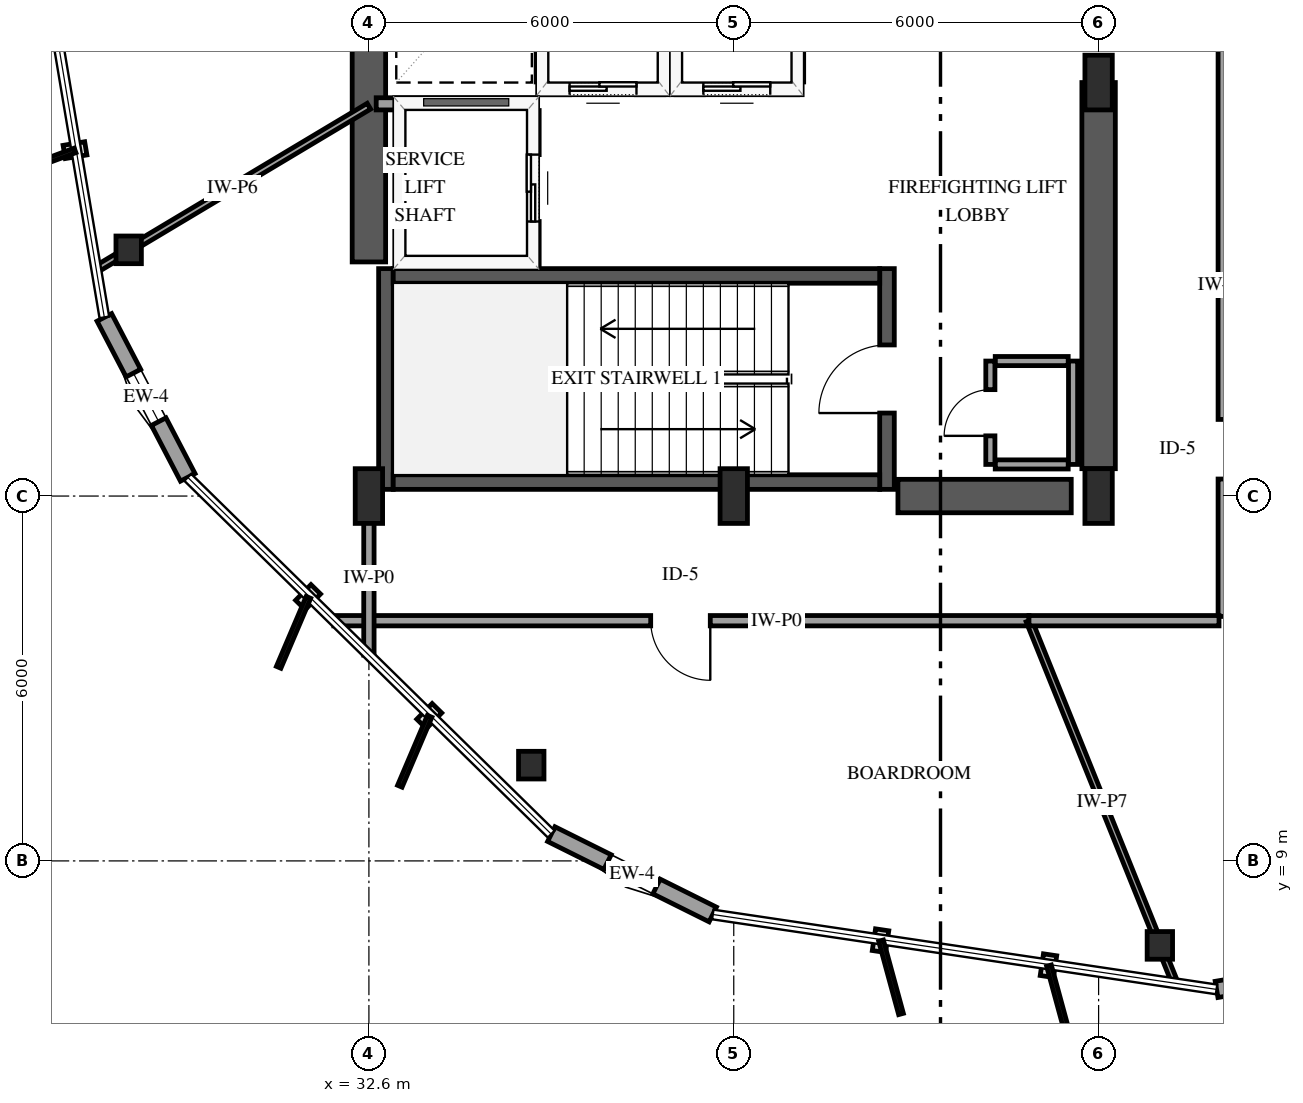
"""IFC4 building model, lengths in metres.
Left out: names, types, materials, properties, quantities, classifications, styles, units other than length and angle.
Written with IfcOpenShell. Run it as: python <this file> out.ifc"""

import sys

from ifc_helpers import new_model, si_unit, direction, frame, frame_2d, origin, origin_2d, place, context, subcontext, project, spatial, rectangle, i_section, extrude, element, fill, save


model = new_model("IFC4")
c1 = context("Model", 3, precision=1e-05, world=origin(), true_north=direction((0.0, 1.0)))
c2 = subcontext(c1, "Body", "Model", "MODEL_VIEW")
j1 = project(units=[si_unit("LENGTHUNIT", "METRE"), si_unit("PLANEANGLEUNIT", "RADIAN")], contexts=[c1])
p1 = place(None, origin())
s1 = spatial("IfcSite", under=j1, at=p1, CompositionType="ELEMENT")
p2 = place(p1, origin())
s2 = spatial("IfcBuilding", under=s1, at=p2, CompositionType="ELEMENT")
p3 = place(p2, frame((0.0, 0.0, 134.2)))
s3 = spatial("IfcBuildingStorey", under=s2, at=p3, CompositionType="ELEMENT", Elevation=134.2)
p4 = place(p3, frame((32.88, 15.11, 0.0), z_axis=(0.0, 0.0, 1.0), x_axis=(0.0, 1.0, 0.0)))
e1 = element("IfcWall", 1, at=p4, inside=s3, PredefinedType="SHEAR", context=c2, shape_type="SweptSolid", body=[
    extrude(rectangle(XDim=3.63, YDim=0.24, at=frame_2d((1.815, 0.0))), origin(), (0.0, 0.0, 1.0), 4.8),
])
p5 = place(p3, frame((41.12, 15.11, 0.0), z_axis=(0.0, 0.0, 1.0), x_axis=(0.0, 1.0, 0.0)))
e2 = element("IfcWall", 2, at=p5, inside=s3, PredefinedType="SHEAR", context=c2, shape_type="SweptSolid", body=[
    extrude(rectangle(XDim=3.63, YDim=0.24, at=frame_2d((1.815, 0.0))), origin(), (0.0, 0.0, 1.0), 4.8),
])
p6 = place(p5, frame((1.255, 0.0, 0.0)))
e3 = element("IfcOpeningElement", 3, at=p6, cuts=e2, PredefinedType="OPENING", context=c2, shape_type="SweptSolid", body=[
    extrude(rectangle(XDim=1.12, YDim=2.15, at=frame_2d((0.56, 1.075))), frame((0.0, 0.13, 0.0), z_axis=(0.0, -1.0, 0.0), x_axis=(1.0, 0.0, 0.0)), (0.0, 0.0, 1.0), 0.26),
])
for number, where, z_axis, x_axis in (
    (4, (33.0, 15.23, 0.0), (0.0, 0.0, 1.0), (1.0, 0.0, 0.0)),
    (5, (33.0, 18.62, 0.0), (0.0, 0.0, 1.0), (1.0, 0.0, 0.0)),
):
    element("IfcWall", number, at=place(p3, frame(where, z_axis=z_axis, x_axis=x_axis)), inside=s3, PredefinedType="SHEAR", context=c2, shape_type="SweptSolid", body=[
        extrude(rectangle(XDim=8.0, YDim=0.24, at=frame_2d((4.0, 0.0))), origin(), (0.0, 0.0, 1.0), 4.8),
    ])
p7 = place(p3, frame((32.6, 18.85, 0.0), z_axis=(0.0, 0.0, 1.0), x_axis=(0.0, 1.0, 0.0)))
e6 = element("IfcWall", 6, at=p7, inside=s3, PredefinedType="SHEAR", context=c2, shape_type="SweptSolid", body=[
    extrude(rectangle(XDim=12.3, YDim=0.55, at=frame_2d((6.15, 0.0))), origin(), (0.0, 0.0, 1.0), 4.8),
])
p8 = place(p3, frame((41.3, 15.0, 0.0), z_axis=(0.0, 0.0, 1.0), x_axis=(1.0, 0.0, 0.0)))
e7 = element("IfcWall", 7, at=p8, inside=s3, PredefinedType="SHEAR", context=c2, shape_type="SweptSolid", body=[
    extrude(rectangle(XDim=2.85, YDim=0.55, at=frame_2d((1.425, 0.0))), origin(), (0.0, 0.0, 1.0), 4.8),
])
p9 = place(p3, frame((44.6, 15.45, 0.0), z_axis=(0.0, 0.0, 1.0), x_axis=(0.0, 1.0, 0.0)))
e8 = element("IfcWall", 8, at=p9, inside=s3, PredefinedType="SHEAR", context=c2, shape_type="SweptSolid", body=[
    extrude(rectangle(XDim=6.35, YDim=0.55, at=frame_2d((3.175, 0.0))), origin(), (0.0, 0.0, 1.0), 4.8),
])
for number, where, z_axis, x_axis in (
    (9, (32.6, 15.0, 0.0), (0.0, 0.0, 1.0), (1.0, 0.0, 0.0)),
    (10, (38.6, 15.0, 0.0), (0.0, 0.0, 1.0), (1.0, 0.0, 0.0)),
    (11, (44.6, 15.0, 0.0), (0.0, 0.0, 1.0), (1.0, 0.0, 0.0)),
    (12, (44.6, 21.8, 0.0), (0.0, 0.0, 1.0), (1.0, 0.0, 0.0)),
):
    element("IfcColumn", number, at=place(p3, frame(where, z_axis=z_axis, x_axis=x_axis)), inside=s3, PredefinedType="PILASTER", context=c2, shape_type="SweptSolid", body=[
        extrude(rectangle(XDim=0.45, YDim=0.9, at=origin_2d()), origin(), (0.0, 0.0, 1.0), 4.5),
    ])
for number, where, z_axis, x_axis in (
    (13, (28.649, 19.049, 0.0), (0.0, 0.0, 1.0), (1.0, 0.0, 0.0)),
    (14, (35.27, 10.575, 0.0), (0.0, 0.0, 1.0), (1.0, 0.0, 0.0)),
    (15, (45.607, 7.611, 0.0), (0.0, 0.0, 1.0), (1.0, 0.0, 0.0)),
):
    element("IfcColumn", number, at=place(p3, frame(where, z_axis=z_axis, x_axis=x_axis)), inside=s3, PredefinedType="COLUMN", context=c2, shape_type="SweptSolid", body=[
        extrude(i_section(OverallWidth=0.418, OverallDepth=0.455, WebThickness=0.042, FlangeThickness=0.068, FilletRadius=0.038, at=origin_2d()), origin(), (0.0, 0.0, 1.0), 4.5),
    ])
p10 = place(p3, frame((28.249, 17.938, 0.0), z_axis=(0.0, 0.0, 1.0), x_axis=(0.462422563067, -0.886659671558, 0.0)))
e16 = element("IfcWall", 16, at=p10, inside=s3, PredefinedType="SOLIDWALL", context=c2, shape_type="SweptSolid", body=[
    extrude(rectangle(XDim=2.967, YDim=0.27, at=frame_2d((1.483, 0.0))), origin(), (0.0, 0.0, 1.0), 3.879),
])
p11 = place(p10, frame((1.033, 0.0, 0.75)))
e17 = element("IfcOpeningElement", 17, at=p11, cuts=e16, PredefinedType="OPENING", context=c2, shape_type="SweptSolid", body=[
    extrude(rectangle(XDim=0.9, YDim=1.5, at=frame_2d((0.45, 0.75))), frame((0.0, 0.145, 0.0), z_axis=(0.0, -1.0, 0.0), x_axis=(1.0, 0.0, 0.0)), (0.0, 0.0, 1.0), 0.29),
])
p12 = place(p3, frame((35.599, 9.441, 0.0), z_axis=(0.0, 0.0, 1.0), x_axis=(0.895215836877, -0.445632814551, 0.0)))
e18 = element("IfcWall", 18, at=p12, inside=s3, PredefinedType="SOLIDWALL", context=c2, shape_type="SweptSolid", body=[
    extrude(rectangle(XDim=2.967, YDim=0.27, at=frame_2d((1.483, 0.0))), origin(), (0.0, 0.0, 1.0), 3.879),
])
p13 = place(p12, frame((1.033, 0.0, 0.75)))
e19 = element("IfcOpeningElement", 19, at=p13, cuts=e18, PredefinedType="OPENING", context=c2, shape_type="SweptSolid", body=[
    extrude(rectangle(XDim=0.9, YDim=1.5, at=frame_2d((0.45, 0.75))), frame((0.0, 0.145, 0.0), z_axis=(0.0, -1.0, 0.0), x_axis=(1.0, 0.0, 0.0)), (0.0, 0.0, 1.0), 0.29),
])
p14 = place(p3, frame((46.54, 6.887, 0.0), z_axis=(0.0, 0.0, 1.0), x_axis=(0.986168353547, 0.165746729871, 0.0)))
e20 = element("IfcWall", 20, at=p14, inside=s3, PredefinedType="SOLIDWALL", context=c2, shape_type="SweptSolid", body=[
    extrude(rectangle(XDim=2.967, YDim=0.27, at=frame_2d((1.483, 0.0))), origin(), (0.0, 0.0, 1.0), 3.879),
])
p15 = place(p14, frame((1.033, 0.0, 0.75)))
e21 = element("IfcOpeningElement", 21, at=p15, cuts=e20, PredefinedType="OPENING", context=c2, shape_type="SweptSolid", body=[
    extrude(rectangle(XDim=0.9, YDim=1.5, at=frame_2d((0.45, 0.75))), frame((0.0, 0.145, 0.0), z_axis=(0.0, -1.0, 0.0), x_axis=(1.0, 0.0, 0.0)), (0.0, 0.0, 1.0), 0.29),
])
p16 = place(p3, frame((35.45, 21.7, 0.0), z_axis=(0.0, 0.0, 1.0), x_axis=(1.0, 0.0, 0.0)))
e22 = element("IfcWall", 22, at=p16, inside=s3, PredefinedType="SOLIDWALL", context=c2, shape_type="SweptSolid", body=[
    extrude(rectangle(XDim=2.0, YDim=0.2, at=frame_2d((1.0, 0.0))), origin(), (0.0, 0.0, 1.0), 4.5),
])
p17 = place(p16, frame((0.45, 0.0, 0.0)))
e23 = element("IfcOpeningElement", 23, at=p17, cuts=e22, PredefinedType="OPENING", context=c2, shape_type="SweptSolid", body=[
    extrude(rectangle(XDim=1.1, YDim=2.15, at=frame_2d((0.55, 1.075))), frame((0.0, 0.11, 0.0), z_axis=(0.0, -1.0, 0.0), x_axis=(1.0, 0.0, 0.0)), (0.0, 0.0, 1.0), 0.22),
])
for number, where, z_axis, x_axis in (
    (24, (35.45, 21.81, 0.0), (0.0, 0.0, 1.0), (0.0, 1.0, 0.0)),
    (25, (37.45, 21.81, 0.0), (0.0, 0.0, 1.0), (0.0, 1.0, 0.0)),
):
    element("IfcWall", number, at=place(p3, frame(where, z_axis=z_axis, x_axis=x_axis)), inside=s3, PredefinedType="SOLIDWALL", context=c2, shape_type="SweptSolid", body=[
        extrude(rectangle(XDim=2.38, YDim=0.2, at=frame_2d((1.19, 0.0))), origin(), (0.0, 0.0, 1.0), 4.5),
    ])
p18 = place(p3, frame((37.65, 21.7, 0.0), z_axis=(0.0, 0.0, 1.0), x_axis=(1.0, 0.0, 0.0)))
e26 = element("IfcWall", 26, at=p18, inside=s3, PredefinedType="SOLIDWALL", context=c2, shape_type="SweptSolid", body=[
    extrude(rectangle(XDim=2.0, YDim=0.2, at=frame_2d((1.0, 0.0))), origin(), (0.0, 0.0, 1.0), 4.5),
])
p19 = place(p18, frame((0.45, 0.0, 0.0)))
e27 = element("IfcOpeningElement", 27, at=p19, cuts=e26, PredefinedType="OPENING", context=c2, shape_type="SweptSolid", body=[
    extrude(rectangle(XDim=1.1, YDim=2.15, at=frame_2d((0.55, 1.075))), frame((0.0, 0.11, 0.0), z_axis=(0.0, -1.0, 0.0), x_axis=(1.0, 0.0, 0.0)), (0.0, 0.0, 1.0), 0.22),
])
p20 = place(p3, frame((39.65, 21.81, 0.0), z_axis=(0.0, 0.0, 1.0), x_axis=(0.0, 1.0, 0.0)))
e28 = element("IfcWall", 28, at=p20, inside=s3, PredefinedType="SOLIDWALL", context=c2, shape_type="SweptSolid", body=[
    extrude(rectangle(XDim=2.38, YDim=0.2, at=frame_2d((1.19, 0.0))), origin(), (0.0, 0.0, 1.0), 4.5),
])
p21 = place(p3, frame((32.72, 21.45, 0.0), z_axis=(0.0, 0.0, 1.0), x_axis=(1.0, 0.0, 0.0)))
e29 = element("IfcWall", 29, at=p21, inside=s3, PredefinedType="SOLIDWALL", context=c2, shape_type="SweptSolid", body=[
    extrude(rectangle(XDim=2.58, YDim=0.2, at=frame_2d((1.29, 0.0))), origin(), (0.0, 0.0, 1.0), 4.5),
])
p22 = place(p3, frame((35.3, 18.79, 0.0), z_axis=(0.0, 0.0, 1.0), x_axis=(0.0, 1.0, 0.0)))
e30 = element("IfcWall", 30, at=p22, inside=s3, PredefinedType="SOLIDWALL", context=c2, shape_type="SweptSolid", body=[
    extrude(rectangle(XDim=2.55, YDim=0.2, at=frame_2d((1.275, 0.0))), origin(), (0.0, 0.0, 1.0), 4.5),
])
p23 = place(p22, frame((0.725, 0.0, 0.0)))
e31 = element("IfcOpeningElement", 31, at=p23, cuts=e30, PredefinedType="OPENING", context=c2, shape_type="SweptSolid", body=[
    extrude(rectangle(XDim=1.1, YDim=2.15, at=frame_2d((0.55, 1.075))), frame((0.0, 0.11, 0.0), z_axis=(0.0, -1.0, 0.0), x_axis=(1.0, 0.0, 0.0)), (0.0, 0.0, 1.0), 0.22),
])
for number, where, z_axis, x_axis in (
    (32, (42.9, 15.52, 0.0), (0.0, 0.0, 1.0), (1.0, 0.0, 0.0)),
    (33, (42.9, 17.22, 0.0), (0.0, 0.0, 1.0), (1.0, 0.0, 0.0)),
):
    element("IfcWall", number, at=place(p3, frame(where, z_axis=z_axis, x_axis=x_axis)), inside=s3, PredefinedType="PARTITIONING", context=c2, shape_type="SweptSolid", body=[
        extrude(rectangle(XDim=1.2, YDim=0.15, at=frame_2d((0.6, 0.0))), origin(), (0.0, 0.0, 1.0), 4.5),
    ])
p24 = place(p3, frame((44.18, 15.52, 0.0), z_axis=(0.0, 0.0, 1.0), x_axis=(0.0, 1.0, 0.0)))
e34 = element("IfcWall", 34, at=p24, inside=s3, PredefinedType="PARTITIONING", context=c2, shape_type="SweptSolid", body=[
    extrude(rectangle(XDim=1.7, YDim=0.15, at=frame_2d((0.85, 0.0))), origin(), (0.0, 0.0, 1.0), 4.5),
])
p25 = place(p3, frame((42.82, 15.52, 0.0), z_axis=(0.0, 0.0, 1.0), x_axis=(0.0, 1.0, 0.0)))
e35 = element("IfcWall", 35, at=p25, inside=s3, PredefinedType="PARTITIONING", context=c2, shape_type="SweptSolid", body=[
    extrude(rectangle(XDim=1.7, YDim=0.15, at=frame_2d((0.85, 0.0))), origin(), (0.0, 0.0, 1.0), 4.5),
])
p26 = place(p25, frame((0.47, 0.0, 0.0)))
e36 = element("IfcOpeningElement", 36, at=p26, cuts=e35, PredefinedType="OPENING", context=c2, shape_type="SweptSolid", body=[
    extrude(rectangle(XDim=0.76, YDim=2.0, at=frame_2d((0.38, 1.0))), frame((0.0, 0.085, 0.0), z_axis=(0.0, -1.0, 0.0), x_axis=(1.0, 0.0, 0.0)), (0.0, 0.0, 1.0), 0.17),
])
p27 = place(p3, frame((46.65, 18.55, 0.0), z_axis=(0.0, 0.0, 1.0), x_axis=(0.780419315433, -0.625256501045, 0.0)))
e37 = element("IfcWall", 37, at=p27, inside=s3, PredefinedType="PARTITIONING", context=c2, shape_type="SweptSolid", body=[
    extrude(rectangle(XDim=12.246, YDim=0.14, at=frame_2d((6.123, 0.0))), origin(), (0.0, 0.0, 1.0), 2.79),
])
p28 = place(p3, frame((43.455, 12.95, 0.0), z_axis=(0.0, 0.0, 1.0), x_axis=(-1.0, 0.0, 0.0)))
e38 = element("IfcWall", 38, at=p28, inside=s3, PredefinedType="PARTITIONING", context=c2, shape_type="SweptSolid", body=[
    extrude(rectangle(XDim=11.432, YDim=0.17, at=frame_2d((5.716, 0.0))), origin(), (0.0, 0.0, 1.0), 4.5),
])
p29 = place(p28, frame((5.241, 0.0, 0.0)))
e39 = element("IfcOpeningElement", 39, at=p29, cuts=e38, PredefinedType="OPENING", context=c2, shape_type="SweptSolid", body=[
    extrude(rectangle(XDim=0.98, YDim=2.15, at=frame_2d((0.49, 1.075))), frame((0.0, 0.095, 0.0), z_axis=(0.0, -1.0, 0.0), x_axis=(1.0, 0.0, 0.0)), (0.0, 0.0, 1.0), 0.19),
])
p30 = place(p3, frame((43.455, 12.95, 0.0), z_axis=(0.0, 0.0, 1.0), x_axis=(0.373812359394, -0.927504350375, 0.0)))
e40 = element("IfcWall", 40, at=p30, inside=s3, PredefinedType="PARTITIONING", context=c2, shape_type="SweptSolid", body=[
    extrude(rectangle(XDim=6.428, YDim=0.1, at=frame_2d((3.214, 0.0))), origin(), (0.0, 0.0, 1.0), 2.79),
])
p31 = place(p3, frame((46.65, 18.55, 0.0), z_axis=(0.0, 0.0, 1.0), x_axis=(0.0, -1.0, 0.0)))
e41 = element("IfcWall", 41, at=p31, inside=s3, PredefinedType="PARTITIONING", context=c2, shape_type="SweptSolid", body=[
    extrude(rectangle(XDim=5.53, YDim=0.17, at=frame_2d((2.765, 0.0))), origin(), (0.0, 0.0, 1.0), 4.5),
])
p32 = place(p31, frame((2.29, 0.0, 0.0)))
e42 = element("IfcOpeningElement", 42, at=p32, cuts=e41, PredefinedType="OPENING", context=c2, shape_type="SweptSolid", body=[
    extrude(rectangle(XDim=0.98, YDim=2.15, at=frame_2d((0.49, 1.075))), frame((0.0, 0.095, 0.0), z_axis=(0.0, -1.0, 0.0), x_axis=(1.0, 0.0, 0.0)), (0.0, 0.0, 1.0), 0.19),
])
p33 = place(p3, frame((46.65, 23.93, 0.0), z_axis=(0.0, 0.0, 1.0), x_axis=(0.0, -1.0, 0.0)))
e43 = element("IfcWall", 43, at=p33, inside=s3, PredefinedType="PARTITIONING", context=c2, shape_type="SweptSolid", body=[
    extrude(rectangle(XDim=5.38, YDim=0.17, at=frame_2d((2.69, 0.0))), origin(), (0.0, 0.0, 1.0), 4.5),
])
p34 = place(p3, frame((32.6, 21.411, 0.0), z_axis=(0.0, 0.0, 1.0), x_axis=(-0.858300031482, -0.513148181287, 0.0)))
e44 = element("IfcWall", 44, at=p34, inside=s3, PredefinedType="PARTITIONING", context=c2, shape_type="SweptSolid", body=[
    extrude(rectangle(XDim=5.224, YDim=0.11, at=frame_2d((2.612, 0.0))), origin(), (0.0, 0.0, 1.0), 4.5),
])
p35 = place(p3, frame((46.58, 12.95, 0.0), z_axis=(0.0, 0.0, 1.0), x_axis=(-1.0, 0.0, 0.0)))
e45 = element("IfcWall", 45, at=p35, inside=s3, PredefinedType="PARTITIONING", context=c2, shape_type="SweptSolid", body=[
    extrude(rectangle(XDim=3.125, YDim=0.17, at=frame_2d((1.562, 0.0))), origin(), (0.0, 0.0, 1.0), 4.5),
])
p36 = place(p3, frame((32.6, 12.384, 0.0), z_axis=(0.0, 0.0, 1.0), x_axis=(0.0, 1.0, 0.0)))
e46 = element("IfcWall", 46, at=p36, inside=s3, PredefinedType="PARTITIONING", context=c2, shape_type="SweptSolid", body=[
    extrude(rectangle(XDim=2.546, YDim=0.17, at=frame_2d((1.273, 0.0))), origin(), (0.0, 0.0, 1.0), 4.5),
])
p37 = place(p11, origin())
e47 = element("IfcWindow", 47, at=p37, inside=s3, PartitioningType="SINGLE_PANEL", PredefinedType="WINDOW", context=c2, shape_type="SweptSolid", body=[
    extrude(rectangle(XDim=0.9, YDim=1.5, at=frame_2d((0.45, 0.75))), frame((0.0, 0.03, 0.0), z_axis=(0.0, -1.0, 0.0), x_axis=(1.0, 0.0, 0.0)), (0.0, 0.0, 1.0), 0.06),
])
fill(e17, e47)
p38 = place(p13, origin())
e48 = element("IfcWindow", 48, at=p38, inside=s3, PartitioningType="SINGLE_PANEL", PredefinedType="WINDOW", context=c2, shape_type="SweptSolid", body=[
    extrude(rectangle(XDim=0.9, YDim=1.5, at=frame_2d((0.45, 0.75))), frame((0.0, 0.03, 0.0), z_axis=(0.0, -1.0, 0.0), x_axis=(1.0, 0.0, 0.0)), (0.0, 0.0, 1.0), 0.06),
])
fill(e19, e48)
p39 = place(p17, origin())
e49 = element("IfcDoor", 49, at=p39, inside=s3, OperationType="SLIDING_TO_LEFT", PredefinedType="DOOR", context=c2, shape_type="SweptSolid", body=[
    extrude(rectangle(XDim=1.1, YDim=2.15, at=frame_2d((0.55, 1.075))), frame((0.0, 0.025, 0.0), z_axis=(0.0, -1.0, 0.0), x_axis=(1.0, 0.0, 0.0)), (0.0, 0.0, 1.0), 0.05),
])
fill(e23, e49)
p40 = place(p19, origin())
e50 = element("IfcDoor", 50, at=p40, inside=s3, OperationType="SLIDING_TO_LEFT", PredefinedType="DOOR", context=c2, shape_type="SweptSolid", body=[
    extrude(rectangle(XDim=1.1, YDim=2.15, at=frame_2d((0.55, 1.075))), frame((0.0, 0.025, 0.0), z_axis=(0.0, -1.0, 0.0), x_axis=(1.0, 0.0, 0.0)), (0.0, 0.0, 1.0), 0.05),
])
fill(e27, e50)
p41 = place(p23, origin())
e51 = element("IfcDoor", 51, at=p41, inside=s3, OperationType="SLIDING_TO_LEFT", PredefinedType="DOOR", context=c2, shape_type="SweptSolid", body=[
    extrude(rectangle(XDim=1.1, YDim=2.15, at=frame_2d((0.55, 1.075))), frame((0.0, 0.025, 0.0), z_axis=(0.0, -1.0, 0.0), x_axis=(1.0, 0.0, 0.0)), (0.0, 0.0, 1.0), 0.05),
])
fill(e31, e51)
p42 = place(p6, origin())
e52 = element("IfcDoor", 52, at=p42, inside=s3, OperationType="SINGLE_SWING_LEFT", PredefinedType="DOOR", context=c2, shape_type="SweptSolid", body=[
    extrude(rectangle(XDim=1.12, YDim=2.15, at=frame_2d((0.56, 1.075))), frame((0.0, 0.025, 0.0), z_axis=(0.0, -1.0, 0.0), x_axis=(1.0, 0.0, 0.0)), (0.0, 0.0, 1.0), 0.05),
])
fill(e3, e52)
p43 = place(p26, origin())
e53 = element("IfcDoor", 53, at=p43, inside=s3, OperationType="SINGLE_SWING_LEFT", PredefinedType="TRAPDOOR", context=c2, shape_type="SweptSolid", body=[
    extrude(rectangle(XDim=0.76, YDim=2.0, at=frame_2d((0.38, 1.0))), frame((0.0, 0.025, 0.0), z_axis=(0.0, -1.0, 0.0), x_axis=(1.0, 0.0, 0.0)), (0.0, 0.0, 1.0), 0.05),
])
fill(e36, e53)
p44 = place(p29, origin())
e54 = element("IfcDoor", 54, at=p44, inside=s3, OperationType="SINGLE_SWING_LEFT", PredefinedType="DOOR", context=c2, shape_type="SweptSolid", body=[
    extrude(rectangle(XDim=0.98, YDim=2.15, at=frame_2d((0.49, 1.075))), frame((0.0, 0.025, 0.0), z_axis=(0.0, -1.0, 0.0), x_axis=(1.0, 0.0, 0.0)), (0.0, 0.0, 1.0), 0.05),
])
fill(e39, e54)
p45 = place(p32, origin())
e55 = element("IfcDoor", 55, at=p45, inside=s3, OperationType="SINGLE_SWING_RIGHT", PredefinedType="DOOR", context=c2, shape_type="SweptSolid", body=[
    extrude(rectangle(XDim=0.98, YDim=2.15, at=frame_2d((0.49, 1.075))), frame((0.0, 0.025, 0.0), z_axis=(0.0, -1.0, 0.0), x_axis=(1.0, 0.0, 0.0)), (0.0, 0.0, 1.0), 0.05),
])
fill(e42, e55)
save(model, sys.argv[1])
